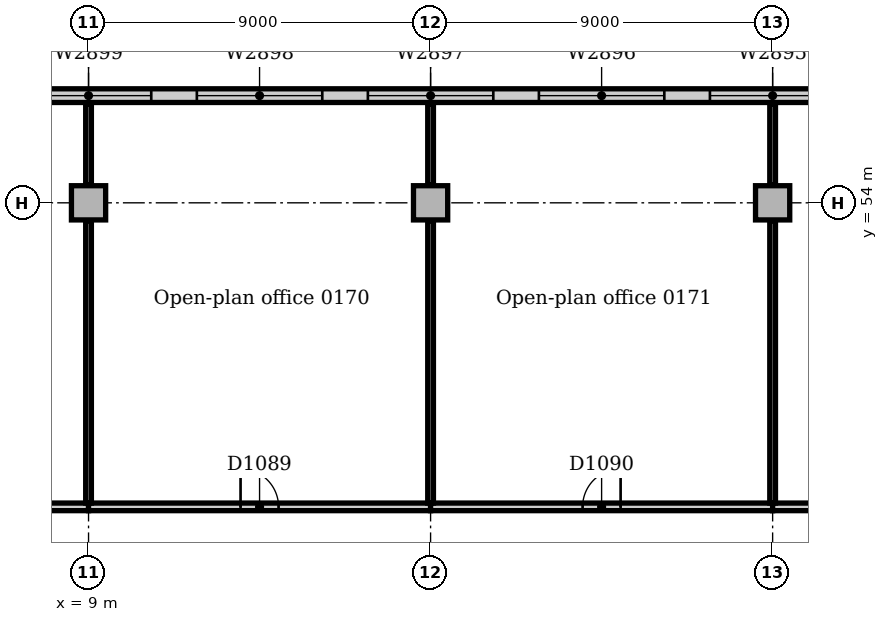
"""IFC4 building model, lengths in metres.
Left out: names, types, materials, properties, quantities, classifications, styles, units other than length and angle.
Written with IfcOpenShell. Run it as: python <this file> out.ifc"""

import sys

from ifc_helpers import new_model, si_unit, direction, frame, frame_2d, origin, origin_2d, place, context, subcontext, project, spatial, rectangle, extrude, element, fill, save


model = new_model("IFC4")
c1 = context("Model", 3, precision=1e-05, world=origin(), true_north=direction((0.0, 1.0)))
c2 = subcontext(c1, "Body", "Model", "MODEL_VIEW")
j1 = project(units=[si_unit("LENGTHUNIT", "METRE"), si_unit("PLANEANGLEUNIT", "RADIAN")], contexts=[c1])
p1 = place(None, origin())
s1 = spatial("IfcSite", under=j1, at=p1, CompositionType="ELEMENT")
p2 = place(p1, origin())
s2 = spatial("IfcBuilding", under=s1, at=p2, CompositionType="ELEMENT")
p3 = place(p2, frame((0.0, 0.0, 6.0)))
s3 = spatial("IfcBuildingStorey", under=s2, at=p3, CompositionType="ELEMENT", Elevation=6.0)
for number, where, z_axis, x_axis in (
    (1, (9.0, 54.0, 0.0), (0.0, 0.0, 1.0), (1.0, 0.0, 0.0)),
    (2, (18.0, 54.0, 0.0), (0.0, 0.0, 1.0), (1.0, 0.0, 0.0)),
    (3, (27.0, 54.0, 0.0), (0.0, 0.0, 1.0), (1.0, 0.0, 0.0)),
):
    element("IfcColumn", number, at=place(p3, frame(where, z_axis=z_axis, x_axis=x_axis)), inside=s3, PredefinedType="COLUMN", context=c2, shape_type="SweptSolid", body=[
        extrude(rectangle(XDim=0.9, YDim=0.9, at=origin_2d()), origin(), (0.0, 0.0, 1.0), 4.7),
    ])
p4 = place(p3, frame((63.0, 56.82, 0.0), z_axis=(0.0, 0.0, 1.0), x_axis=(-1.0, 0.0, 0.0)))
e4 = element("IfcWall", 4, at=p4, inside=s3, PredefinedType="STANDARD", context=c2, shape_type="SweptSolid", body=[
    extrude(rectangle(XDim=144.0, YDim=0.36, at=frame_2d((72.0, 0.0))), origin(), (0.0, 0.0, 1.0), 4.7),
])
p5 = place(p4, frame((2.85, 0.0, 0.9)))
e5 = element("IfcOpeningElement", 5, at=p5, cuts=e4, PredefinedType="OPENING", context=c2, shape_type="SweptSolid", body=[
    extrude(rectangle(XDim=3.3, YDim=2.4, at=frame_2d((1.65, 1.2))), frame((0.0, 0.19, 0.0), z_axis=(0.0, -1.0, 0.0), x_axis=(1.0, 0.0, 0.0)), (0.0, 0.0, 1.0), 0.38),
])
p6 = place(p4, frame((7.35, 0.0, 0.9)))
e6 = element("IfcOpeningElement", 6, at=p6, cuts=e4, PredefinedType="OPENING", context=c2, shape_type="SweptSolid", body=[
    extrude(rectangle(XDim=3.3, YDim=2.4, at=frame_2d((1.65, 1.2))), frame((0.0, 0.19, 0.0), z_axis=(0.0, -1.0, 0.0), x_axis=(1.0, 0.0, 0.0)), (0.0, 0.0, 1.0), 0.38),
])
p7 = place(p4, frame((11.85, 0.0, 0.9)))
e7 = element("IfcOpeningElement", 7, at=p7, cuts=e4, PredefinedType="OPENING", context=c2, shape_type="SweptSolid", body=[
    extrude(rectangle(XDim=3.3, YDim=2.4, at=frame_2d((1.65, 1.2))), frame((0.0, 0.19, 0.0), z_axis=(0.0, -1.0, 0.0), x_axis=(1.0, 0.0, 0.0)), (0.0, 0.0, 1.0), 0.38),
])
p8 = place(p4, frame((16.35, 0.0, 0.9)))
e8 = element("IfcOpeningElement", 8, at=p8, cuts=e4, PredefinedType="OPENING", context=c2, shape_type="SweptSolid", body=[
    extrude(rectangle(XDim=3.3, YDim=2.4, at=frame_2d((1.65, 1.2))), frame((0.0, 0.19, 0.0), z_axis=(0.0, -1.0, 0.0), x_axis=(1.0, 0.0, 0.0)), (0.0, 0.0, 1.0), 0.38),
])
p9 = place(p4, frame((20.85, 0.0, 0.9)))
e9 = element("IfcOpeningElement", 9, at=p9, cuts=e4, PredefinedType="OPENING", context=c2, shape_type="SweptSolid", body=[
    extrude(rectangle(XDim=3.3, YDim=2.4, at=frame_2d((1.65, 1.2))), frame((0.0, 0.19, 0.0), z_axis=(0.0, -1.0, 0.0), x_axis=(1.0, 0.0, 0.0)), (0.0, 0.0, 1.0), 0.38),
])
p10 = place(p4, frame((25.35, 0.0, 0.9)))
e10 = element("IfcOpeningElement", 10, at=p10, cuts=e4, PredefinedType="OPENING", context=c2, shape_type="SweptSolid", body=[
    extrude(rectangle(XDim=3.3, YDim=2.4, at=frame_2d((1.65, 1.2))), frame((0.0, 0.19, 0.0), z_axis=(0.0, -1.0, 0.0), x_axis=(1.0, 0.0, 0.0)), (0.0, 0.0, 1.0), 0.38),
])
p11 = place(p4, frame((29.85, 0.0, 0.9)))
e11 = element("IfcOpeningElement", 11, at=p11, cuts=e4, PredefinedType="OPENING", context=c2, shape_type="SweptSolid", body=[
    extrude(rectangle(XDim=3.3, YDim=2.4, at=frame_2d((1.65, 1.2))), frame((0.0, 0.19, 0.0), z_axis=(0.0, -1.0, 0.0), x_axis=(1.0, 0.0, 0.0)), (0.0, 0.0, 1.0), 0.38),
])
p12 = place(p4, frame((34.35, 0.0, 0.9)))
e12 = element("IfcOpeningElement", 12, at=p12, cuts=e4, PredefinedType="OPENING", context=c2, shape_type="SweptSolid", body=[
    extrude(rectangle(XDim=3.3, YDim=2.4, at=frame_2d((1.65, 1.2))), frame((0.0, 0.19, 0.0), z_axis=(0.0, -1.0, 0.0), x_axis=(1.0, 0.0, 0.0)), (0.0, 0.0, 1.0), 0.38),
])
p13 = place(p4, frame((38.85, 0.0, 0.9)))
e13 = element("IfcOpeningElement", 13, at=p13, cuts=e4, PredefinedType="OPENING", context=c2, shape_type="SweptSolid", body=[
    extrude(rectangle(XDim=3.3, YDim=2.4, at=frame_2d((1.65, 1.2))), frame((0.0, 0.19, 0.0), z_axis=(0.0, -1.0, 0.0), x_axis=(1.0, 0.0, 0.0)), (0.0, 0.0, 1.0), 0.38),
])
p14 = place(p4, frame((43.35, 0.0, 0.9)))
e14 = element("IfcOpeningElement", 14, at=p14, cuts=e4, PredefinedType="OPENING", context=c2, shape_type="SweptSolid", body=[
    extrude(rectangle(XDim=3.3, YDim=2.4, at=frame_2d((1.65, 1.2))), frame((0.0, 0.19, 0.0), z_axis=(0.0, -1.0, 0.0), x_axis=(1.0, 0.0, 0.0)), (0.0, 0.0, 1.0), 0.38),
])
p15 = place(p4, frame((47.85, 0.0, 0.9)))
e15 = element("IfcOpeningElement", 15, at=p15, cuts=e4, PredefinedType="OPENING", context=c2, shape_type="SweptSolid", body=[
    extrude(rectangle(XDim=3.3, YDim=2.4, at=frame_2d((1.65, 1.2))), frame((0.0, 0.19, 0.0), z_axis=(0.0, -1.0, 0.0), x_axis=(1.0, 0.0, 0.0)), (0.0, 0.0, 1.0), 0.38),
])
p16 = place(p4, frame((52.35, 0.0, 0.9)))
e16 = element("IfcOpeningElement", 16, at=p16, cuts=e4, PredefinedType="OPENING", context=c2, shape_type="SweptSolid", body=[
    extrude(rectangle(XDim=3.3, YDim=2.4, at=frame_2d((1.65, 1.2))), frame((0.0, 0.19, 0.0), z_axis=(0.0, -1.0, 0.0), x_axis=(1.0, 0.0, 0.0)), (0.0, 0.0, 1.0), 0.38),
])
p17 = place(p4, frame((56.85, 0.0, 0.9)))
e17 = element("IfcOpeningElement", 17, at=p17, cuts=e4, PredefinedType="OPENING", context=c2, shape_type="SweptSolid", body=[
    extrude(rectangle(XDim=3.3, YDim=2.4, at=frame_2d((1.65, 1.2))), frame((0.0, 0.19, 0.0), z_axis=(0.0, -1.0, 0.0), x_axis=(1.0, 0.0, 0.0)), (0.0, 0.0, 1.0), 0.38),
])
p18 = place(p4, frame((61.35, 0.0, 0.9)))
e18 = element("IfcOpeningElement", 18, at=p18, cuts=e4, PredefinedType="OPENING", context=c2, shape_type="SweptSolid", body=[
    extrude(rectangle(XDim=3.3, YDim=2.4, at=frame_2d((1.65, 1.2))), frame((0.0, 0.19, 0.0), z_axis=(0.0, -1.0, 0.0), x_axis=(1.0, 0.0, 0.0)), (0.0, 0.0, 1.0), 0.38),
])
p19 = place(p4, frame((65.85, 0.0, 0.9)))
e19 = element("IfcOpeningElement", 19, at=p19, cuts=e4, PredefinedType="OPENING", context=c2, shape_type="SweptSolid", body=[
    extrude(rectangle(XDim=3.3, YDim=2.4, at=frame_2d((1.65, 1.2))), frame((0.0, 0.19, 0.0), z_axis=(0.0, -1.0, 0.0), x_axis=(1.0, 0.0, 0.0)), (0.0, 0.0, 1.0), 0.38),
])
p20 = place(p4, frame((70.35, 0.0, 0.9)))
e20 = element("IfcOpeningElement", 20, at=p20, cuts=e4, PredefinedType="OPENING", context=c2, shape_type="SweptSolid", body=[
    extrude(rectangle(XDim=3.3, YDim=2.4, at=frame_2d((1.65, 1.2))), frame((0.0, 0.19, 0.0), z_axis=(0.0, -1.0, 0.0), x_axis=(1.0, 0.0, 0.0)), (0.0, 0.0, 1.0), 0.38),
])
p21 = place(p4, frame((74.85, 0.0, 0.9)))
e21 = element("IfcOpeningElement", 21, at=p21, cuts=e4, PredefinedType="OPENING", context=c2, shape_type="SweptSolid", body=[
    extrude(rectangle(XDim=3.3, YDim=2.4, at=frame_2d((1.65, 1.2))), frame((0.0, 0.19, 0.0), z_axis=(0.0, -1.0, 0.0), x_axis=(1.0, 0.0, 0.0)), (0.0, 0.0, 1.0), 0.38),
])
p22 = place(p4, frame((79.35, 0.0, 0.9)))
e22 = element("IfcOpeningElement", 22, at=p22, cuts=e4, PredefinedType="OPENING", context=c2, shape_type="SweptSolid", body=[
    extrude(rectangle(XDim=3.3, YDim=2.4, at=frame_2d((1.65, 1.2))), frame((0.0, 0.19, 0.0), z_axis=(0.0, -1.0, 0.0), x_axis=(1.0, 0.0, 0.0)), (0.0, 0.0, 1.0), 0.38),
])
p23 = place(p4, frame((83.85, 0.0, 0.9)))
e23 = element("IfcOpeningElement", 23, at=p23, cuts=e4, PredefinedType="OPENING", context=c2, shape_type="SweptSolid", body=[
    extrude(rectangle(XDim=3.3, YDim=2.4, at=frame_2d((1.65, 1.2))), frame((0.0, 0.19, 0.0), z_axis=(0.0, -1.0, 0.0), x_axis=(1.0, 0.0, 0.0)), (0.0, 0.0, 1.0), 0.38),
])
p24 = place(p4, frame((88.35, 0.0, 0.9)))
e24 = element("IfcOpeningElement", 24, at=p24, cuts=e4, PredefinedType="OPENING", context=c2, shape_type="SweptSolid", body=[
    extrude(rectangle(XDim=3.3, YDim=2.4, at=frame_2d((1.65, 1.2))), frame((0.0, 0.19, 0.0), z_axis=(0.0, -1.0, 0.0), x_axis=(1.0, 0.0, 0.0)), (0.0, 0.0, 1.0), 0.38),
])
p25 = place(p4, frame((92.85, 0.0, 0.9)))
e25 = element("IfcOpeningElement", 25, at=p25, cuts=e4, PredefinedType="OPENING", context=c2, shape_type="SweptSolid", body=[
    extrude(rectangle(XDim=3.3, YDim=2.4, at=frame_2d((1.65, 1.2))), frame((0.0, 0.19, 0.0), z_axis=(0.0, -1.0, 0.0), x_axis=(1.0, 0.0, 0.0)), (0.0, 0.0, 1.0), 0.38),
])
p26 = place(p4, frame((97.35, 0.0, 0.9)))
e26 = element("IfcOpeningElement", 26, at=p26, cuts=e4, PredefinedType="OPENING", context=c2, shape_type="SweptSolid", body=[
    extrude(rectangle(XDim=3.3, YDim=2.4, at=frame_2d((1.65, 1.2))), frame((0.0, 0.19, 0.0), z_axis=(0.0, -1.0, 0.0), x_axis=(1.0, 0.0, 0.0)), (0.0, 0.0, 1.0), 0.38),
])
p27 = place(p4, frame((101.85, 0.0, 0.9)))
e27 = element("IfcOpeningElement", 27, at=p27, cuts=e4, PredefinedType="OPENING", context=c2, shape_type="SweptSolid", body=[
    extrude(rectangle(XDim=3.3, YDim=2.4, at=frame_2d((1.65, 1.2))), frame((0.0, 0.19, 0.0), z_axis=(0.0, -1.0, 0.0), x_axis=(1.0, 0.0, 0.0)), (0.0, 0.0, 1.0), 0.38),
])
p28 = place(p4, frame((106.35, 0.0, 0.9)))
e28 = element("IfcOpeningElement", 28, at=p28, cuts=e4, PredefinedType="OPENING", context=c2, shape_type="SweptSolid", body=[
    extrude(rectangle(XDim=3.3, YDim=2.4, at=frame_2d((1.65, 1.2))), frame((0.0, 0.19, 0.0), z_axis=(0.0, -1.0, 0.0), x_axis=(1.0, 0.0, 0.0)), (0.0, 0.0, 1.0), 0.38),
])
p29 = place(p4, frame((110.85, 0.0, 0.9)))
e29 = element("IfcOpeningElement", 29, at=p29, cuts=e4, PredefinedType="OPENING", context=c2, shape_type="SweptSolid", body=[
    extrude(rectangle(XDim=3.3, YDim=2.4, at=frame_2d((1.65, 1.2))), frame((0.0, 0.19, 0.0), z_axis=(0.0, -1.0, 0.0), x_axis=(1.0, 0.0, 0.0)), (0.0, 0.0, 1.0), 0.38),
])
p30 = place(p4, frame((115.35, 0.0, 0.9)))
e30 = element("IfcOpeningElement", 30, at=p30, cuts=e4, PredefinedType="OPENING", context=c2, shape_type="SweptSolid", body=[
    extrude(rectangle(XDim=3.3, YDim=2.4, at=frame_2d((1.65, 1.2))), frame((0.0, 0.19, 0.0), z_axis=(0.0, -1.0, 0.0), x_axis=(1.0, 0.0, 0.0)), (0.0, 0.0, 1.0), 0.38),
])
p31 = place(p4, frame((119.85, 0.0, 0.9)))
e31 = element("IfcOpeningElement", 31, at=p31, cuts=e4, PredefinedType="OPENING", context=c2, shape_type="SweptSolid", body=[
    extrude(rectangle(XDim=3.3, YDim=2.4, at=frame_2d((1.65, 1.2))), frame((0.0, 0.19, 0.0), z_axis=(0.0, -1.0, 0.0), x_axis=(1.0, 0.0, 0.0)), (0.0, 0.0, 1.0), 0.38),
])
p32 = place(p4, frame((124.35, 0.0, 0.9)))
e32 = element("IfcOpeningElement", 32, at=p32, cuts=e4, PredefinedType="OPENING", context=c2, shape_type="SweptSolid", body=[
    extrude(rectangle(XDim=3.3, YDim=2.4, at=frame_2d((1.65, 1.2))), frame((0.0, 0.19, 0.0), z_axis=(0.0, -1.0, 0.0), x_axis=(1.0, 0.0, 0.0)), (0.0, 0.0, 1.0), 0.38),
])
p33 = place(p4, frame((128.85, 0.0, 0.9)))
e33 = element("IfcOpeningElement", 33, at=p33, cuts=e4, PredefinedType="OPENING", context=c2, shape_type="SweptSolid", body=[
    extrude(rectangle(XDim=3.3, YDim=2.4, at=frame_2d((1.65, 1.2))), frame((0.0, 0.19, 0.0), z_axis=(0.0, -1.0, 0.0), x_axis=(1.0, 0.0, 0.0)), (0.0, 0.0, 1.0), 0.38),
])
p34 = place(p4, frame((133.35, 0.0, 0.9)))
e34 = element("IfcOpeningElement", 34, at=p34, cuts=e4, PredefinedType="OPENING", context=c2, shape_type="SweptSolid", body=[
    extrude(rectangle(XDim=3.3, YDim=2.4, at=frame_2d((1.65, 1.2))), frame((0.0, 0.19, 0.0), z_axis=(0.0, -1.0, 0.0), x_axis=(1.0, 0.0, 0.0)), (0.0, 0.0, 1.0), 0.38),
])
p35 = place(p4, frame((137.85, 0.0, 0.9)))
e35 = element("IfcOpeningElement", 35, at=p35, cuts=e4, PredefinedType="OPENING", context=c2, shape_type="SweptSolid", body=[
    extrude(rectangle(XDim=3.3, YDim=2.4, at=frame_2d((1.65, 1.2))), frame((0.0, 0.19, 0.0), z_axis=(0.0, -1.0, 0.0), x_axis=(1.0, 0.0, 0.0)), (0.0, 0.0, 1.0), 0.38),
])
p36 = place(p3, frame((0.1, 46.0, 0.0), z_axis=(0.0, 0.0, 1.0), x_axis=(1.0, 0.0, 0.0)))
e36 = element("IfcWall", 36, at=p36, inside=s3, PredefinedType="PARTITIONING", context=c2, shape_type="SweptSolid", body=[
    extrude(rectangle(XDim=8.9, YDim=0.2, at=frame_2d((4.45, 0.0))), origin(), (0.0, 0.0, 1.0), 4.7),
])
p37 = place(p36, frame((3.9, 0.0, 0.0)))
e37 = element("IfcOpeningElement", 37, at=p37, cuts=e36, PredefinedType="OPENING", context=c2, shape_type="SweptSolid", body=[
    extrude(rectangle(XDim=1.0, YDim=2.1, at=frame_2d((0.5, 1.05))), frame((0.0, 0.11, 0.0), z_axis=(0.0, -1.0, 0.0), x_axis=(1.0, 0.0, 0.0)), (0.0, 0.0, 1.0), 0.22),
])
p38 = place(p3, frame((9.0, 46.0, 0.0), z_axis=(0.0, 0.0, 1.0), x_axis=(1.0, 0.0, 0.0)))
e38 = element("IfcWall", 38, at=p38, inside=s3, PredefinedType="PARTITIONING", context=c2, shape_type="SweptSolid", body=[
    extrude(rectangle(XDim=9.0, YDim=0.2, at=frame_2d((4.5, 0.0))), origin(), (0.0, 0.0, 1.0), 4.7),
])
p39 = place(p38, frame((4.0, 0.0, 0.0)))
e39 = element("IfcOpeningElement", 39, at=p39, cuts=e38, PredefinedType="OPENING", context=c2, shape_type="SweptSolid", body=[
    extrude(rectangle(XDim=1.0, YDim=2.1, at=frame_2d((0.5, 1.05))), frame((0.0, 0.11, 0.0), z_axis=(0.0, -1.0, 0.0), x_axis=(1.0, 0.0, 0.0)), (0.0, 0.0, 1.0), 0.22),
])
p40 = place(p3, frame((18.0, 46.0, 0.0), z_axis=(0.0, 0.0, 1.0), x_axis=(1.0, 0.0, 0.0)))
e40 = element("IfcWall", 40, at=p40, inside=s3, PredefinedType="PARTITIONING", context=c2, shape_type="SweptSolid", body=[
    extrude(rectangle(XDim=9.0, YDim=0.2, at=frame_2d((4.5, 0.0))), origin(), (0.0, 0.0, 1.0), 4.7),
])
p41 = place(p40, frame((4.0, 0.0, 0.0)))
e41 = element("IfcOpeningElement", 41, at=p41, cuts=e40, PredefinedType="OPENING", context=c2, shape_type="SweptSolid", body=[
    extrude(rectangle(XDim=1.0, YDim=2.1, at=frame_2d((0.5, 1.05))), frame((0.0, 0.11, 0.0), z_axis=(0.0, -1.0, 0.0), x_axis=(1.0, 0.0, 0.0)), (0.0, 0.0, 1.0), 0.22),
])
p42 = place(p3, frame((27.0, 46.0, 0.0), z_axis=(0.0, 0.0, 1.0), x_axis=(1.0, 0.0, 0.0)))
e42 = element("IfcWall", 42, at=p42, inside=s3, PredefinedType="PARTITIONING", context=c2, shape_type="SweptSolid", body=[
    extrude(rectangle(XDim=8.9, YDim=0.2, at=frame_2d((4.45, 0.0))), origin(), (0.0, 0.0, 1.0), 4.7),
])
p43 = place(p42, frame((4.0, 0.0, 0.0)))
e43 = element("IfcOpeningElement", 43, at=p43, cuts=e42, PredefinedType="OPENING", context=c2, shape_type="SweptSolid", body=[
    extrude(rectangle(XDim=1.0, YDim=2.1, at=frame_2d((0.5, 1.05))), frame((0.0, 0.11, 0.0), z_axis=(0.0, -1.0, 0.0), x_axis=(1.0, 0.0, 0.0)), (0.0, 0.0, 1.0), 0.22),
])
p44 = place(p3, frame((9.0, 46.1, 0.0), z_axis=(0.0, 0.0, 1.0), x_axis=(0.0, 1.0, 0.0)))
e44 = element("IfcWall", 44, at=p44, inside=s3, PredefinedType="PARTITIONING", context=c2, shape_type="SweptSolid", body=[
    extrude(rectangle(XDim=7.43, YDim=0.15, at=frame_2d((3.715, 0.0))), origin(), (0.0, 0.0, 1.0), 4.7),
])
p45 = place(p3, frame((9.0, 54.47, 0.0), z_axis=(0.0, 0.0, 1.0), x_axis=(0.0, 1.0, 0.0)))
e45 = element("IfcWall", 45, at=p45, inside=s3, PredefinedType="PARTITIONING", context=c2, shape_type="SweptSolid", body=[
    extrude(rectangle(XDim=2.13, YDim=0.15, at=frame_2d((1.065, 0.0))), origin(), (0.0, 0.0, 1.0), 4.7),
])
p46 = place(p3, frame((18.0, 46.1, 0.0), z_axis=(0.0, 0.0, 1.0), x_axis=(0.0, 1.0, 0.0)))
e46 = element("IfcWall", 46, at=p46, inside=s3, PredefinedType="PARTITIONING", context=c2, shape_type="SweptSolid", body=[
    extrude(rectangle(XDim=7.43, YDim=0.15, at=frame_2d((3.715, 0.0))), origin(), (0.0, 0.0, 1.0), 4.7),
])
p47 = place(p3, frame((18.0, 54.47, 0.0), z_axis=(0.0, 0.0, 1.0), x_axis=(0.0, 1.0, 0.0)))
e47 = element("IfcWall", 47, at=p47, inside=s3, PredefinedType="PARTITIONING", context=c2, shape_type="SweptSolid", body=[
    extrude(rectangle(XDim=2.13, YDim=0.15, at=frame_2d((1.065, 0.0))), origin(), (0.0, 0.0, 1.0), 4.7),
])
p48 = place(p3, frame((27.0, 46.1, 0.0), z_axis=(0.0, 0.0, 1.0), x_axis=(0.0, 1.0, 0.0)))
e48 = element("IfcWall", 48, at=p48, inside=s3, PredefinedType="PARTITIONING", context=c2, shape_type="SweptSolid", body=[
    extrude(rectangle(XDim=7.43, YDim=0.15, at=frame_2d((3.715, 0.0))), origin(), (0.0, 0.0, 1.0), 4.7),
])
p49 = place(p3, frame((27.0, 54.47, 0.0), z_axis=(0.0, 0.0, 1.0), x_axis=(0.0, 1.0, 0.0)))
e49 = element("IfcWall", 49, at=p49, inside=s3, PredefinedType="PARTITIONING", context=c2, shape_type="SweptSolid", body=[
    extrude(rectangle(XDim=2.13, YDim=0.15, at=frame_2d((1.065, 0.0))), origin(), (0.0, 0.0, 1.0), 4.7),
])
p50 = place(p12, origin())
e50 = element("IfcWindow", 50, at=p50, inside=s3, PartitioningType="SINGLE_PANEL", PredefinedType="WINDOW", context=c2, shape_type="SweptSolid", body=[
    extrude(rectangle(XDim=3.3, YDim=2.4, at=frame_2d((1.65, 1.2))), frame((0.0, 0.13, 0.0), z_axis=(0.0, -1.0, 0.0), x_axis=(1.0, 0.0, 0.0)), (0.0, 0.0, 1.0), 0.06),
])
fill(e12, e50)
p51 = place(p13, origin())
e51 = element("IfcWindow", 51, at=p51, inside=s3, PartitioningType="SINGLE_PANEL", PredefinedType="WINDOW", context=c2, shape_type="SweptSolid", body=[
    extrude(rectangle(XDim=3.3, YDim=2.4, at=frame_2d((1.65, 1.2))), frame((0.0, 0.13, 0.0), z_axis=(0.0, -1.0, 0.0), x_axis=(1.0, 0.0, 0.0)), (0.0, 0.0, 1.0), 0.06),
])
fill(e13, e51)
p52 = place(p14, origin())
e52 = element("IfcWindow", 52, at=p52, inside=s3, PartitioningType="SINGLE_PANEL", PredefinedType="WINDOW", context=c2, shape_type="SweptSolid", body=[
    extrude(rectangle(XDim=3.3, YDim=2.4, at=frame_2d((1.65, 1.2))), frame((0.0, 0.13, 0.0), z_axis=(0.0, -1.0, 0.0), x_axis=(1.0, 0.0, 0.0)), (0.0, 0.0, 1.0), 0.06),
])
fill(e14, e52)
p53 = place(p15, origin())
e53 = element("IfcWindow", 53, at=p53, inside=s3, PartitioningType="SINGLE_PANEL", PredefinedType="WINDOW", context=c2, shape_type="SweptSolid", body=[
    extrude(rectangle(XDim=3.3, YDim=2.4, at=frame_2d((1.65, 1.2))), frame((0.0, 0.13, 0.0), z_axis=(0.0, -1.0, 0.0), x_axis=(1.0, 0.0, 0.0)), (0.0, 0.0, 1.0), 0.06),
])
fill(e15, e53)
p54 = place(p16, origin())
e54 = element("IfcWindow", 54, at=p54, inside=s3, PartitioningType="SINGLE_PANEL", PredefinedType="WINDOW", context=c2, shape_type="SweptSolid", body=[
    extrude(rectangle(XDim=3.3, YDim=2.4, at=frame_2d((1.65, 1.2))), frame((0.0, 0.13, 0.0), z_axis=(0.0, -1.0, 0.0), x_axis=(1.0, 0.0, 0.0)), (0.0, 0.0, 1.0), 0.06),
])
fill(e16, e54)
p55 = place(p39, origin())
e55 = element("IfcDoor", 55, at=p55, inside=s3, OperationType="SINGLE_SWING_LEFT", PredefinedType="DOOR", context=c2, shape_type="SweptSolid", body=[
    extrude(rectangle(XDim=1.0, YDim=2.1, at=frame_2d((0.5, 1.05))), frame((0.0, 0.025, 0.0), z_axis=(0.0, -1.0, 0.0), x_axis=(1.0, 0.0, 0.0)), (0.0, 0.0, 1.0), 0.05),
])
fill(e39, e55)
p56 = place(p41, origin())
e56 = element("IfcDoor", 56, at=p56, inside=s3, OperationType="SINGLE_SWING_RIGHT", PredefinedType="DOOR", context=c2, shape_type="SweptSolid", body=[
    extrude(rectangle(XDim=1.0, YDim=2.1, at=frame_2d((0.5, 1.05))), frame((0.0, 0.025, 0.0), z_axis=(0.0, -1.0, 0.0), x_axis=(1.0, 0.0, 0.0)), (0.0, 0.0, 1.0), 0.05),
])
fill(e41, e56)
save(model, sys.argv[1])
